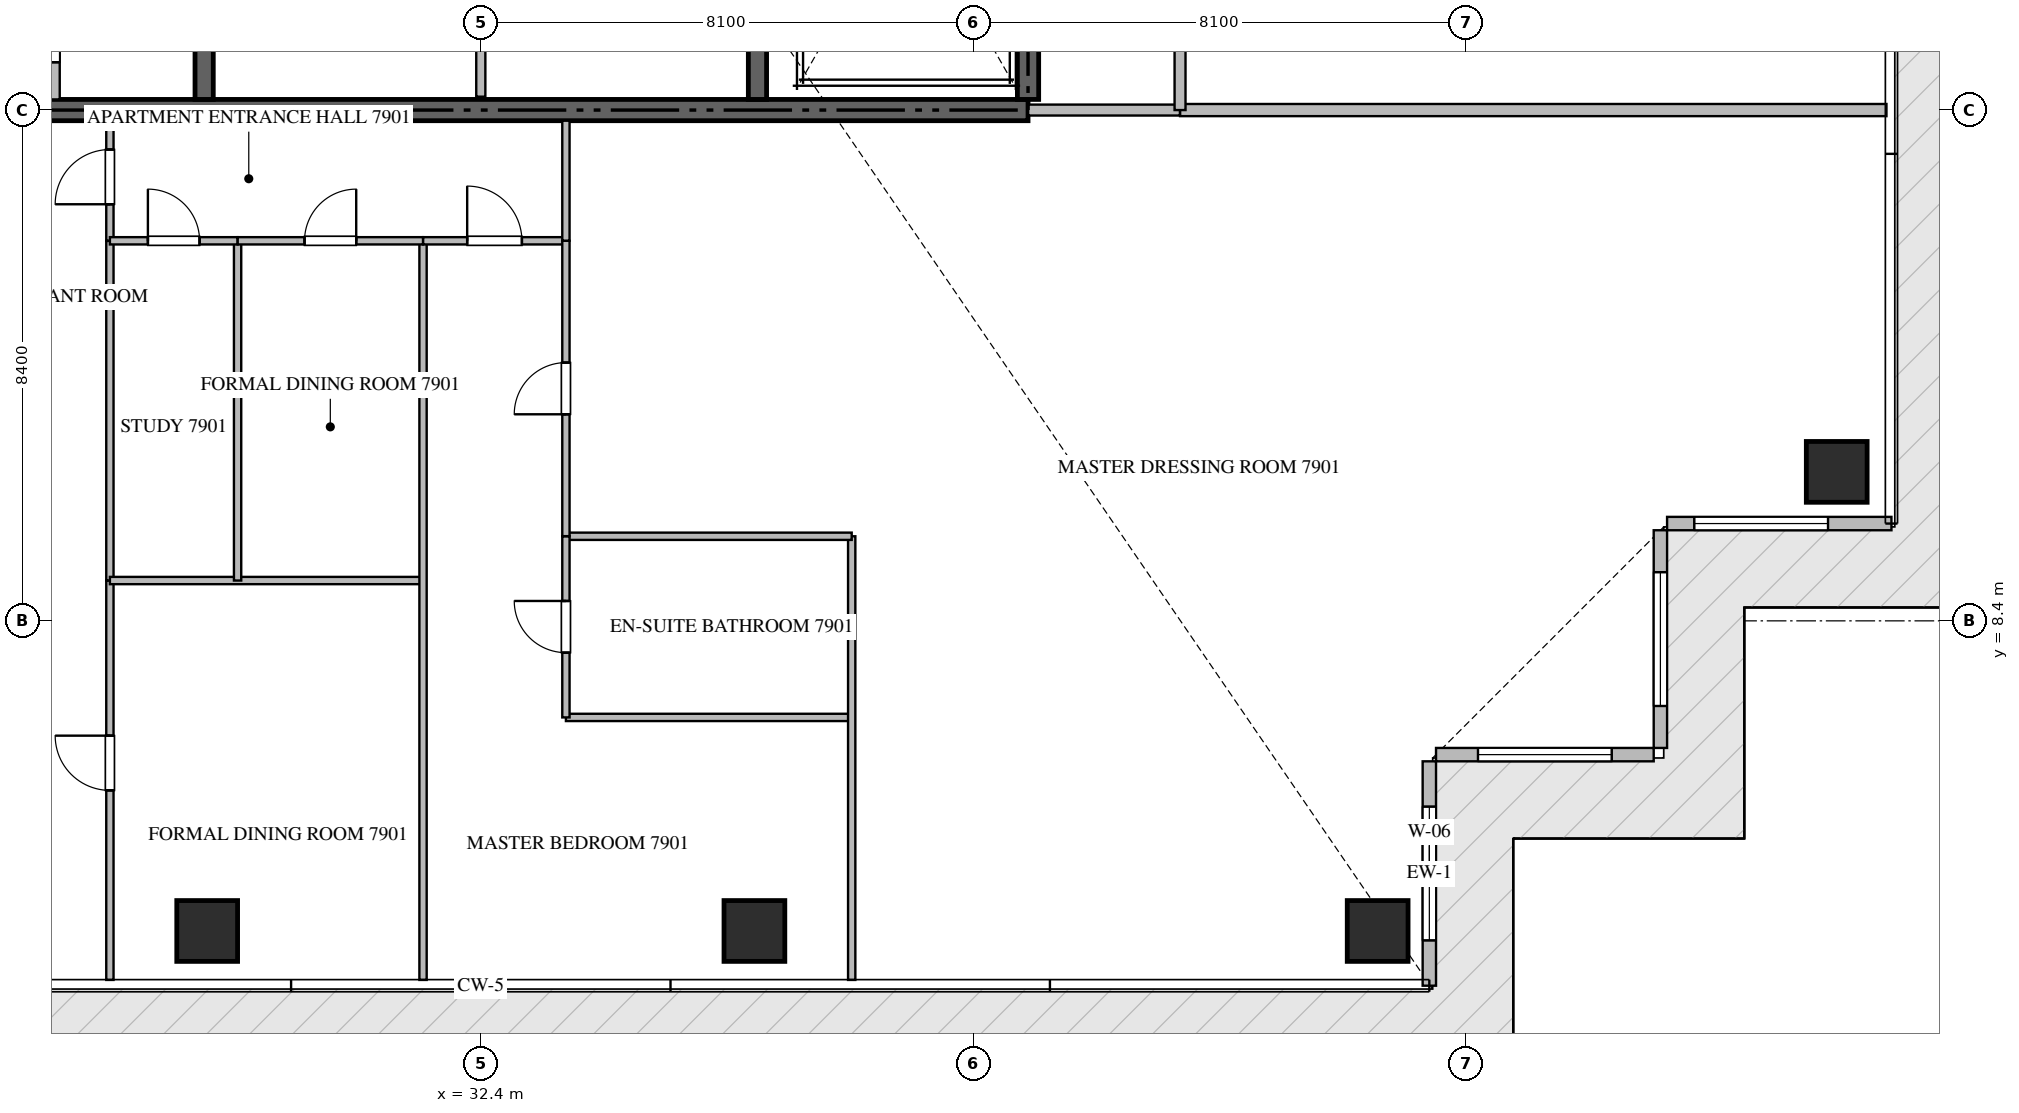
"""IFC4 building model, lengths in metres.
Left out: names, types, materials, properties, quantities, classifications, styles, units other than length and angle.
Written with IfcOpenShell. Run it as: python <this file> out.ifc"""

import sys

from ifc_helpers import new_model, si_unit, direction, frame, frame_2d, origin, origin_2d, place, context, subcontext, project, spatial, rectangle, extrude, source, transform, mapped, element, fill, save


model = new_model("IFC4")
c1 = context("Model", 3, precision=1e-05, world=origin(), true_north=direction((0.0, 1.0)))
c2 = subcontext(c1, "Body", "Model", "MODEL_VIEW")
j1 = project(units=[si_unit("LENGTHUNIT", "METRE"), si_unit("PLANEANGLEUNIT", "RADIAN")], contexts=[c1])
p1 = place(None, origin())
s1 = spatial("IfcSite", under=j1, at=p1, CompositionType="ELEMENT")
p2 = place(p1, origin())
s2 = spatial("IfcBuilding", under=s1, at=p2, CompositionType="ELEMENT")
p3 = place(p2, frame((0.0, 0.0, 317.75)))
s3 = spatial("IfcBuildingStorey", under=s2, at=p3, CompositionType="ELEMENT", Elevation=317.75)
p4 = place(p3, frame((23.4, 16.8, -0.26), z_axis=(0.0, 0.0, 1.0), x_axis=(1.0, 0.0, 0.0)))
e1 = element("IfcWall", 1, at=p4, inside=s3, PredefinedType="SHEAR", context=c2, shape_type="SweptSolid", body=[
    extrude(rectangle(XDim=18.0, YDim=0.35, at=frame_2d((9.0, 0.0))), origin(), (0.0, 0.0, 1.0), 4.048),
])
p5 = place(p3, frame((41.4, 16.975, -0.26), z_axis=(0.0, 0.0, 1.0), x_axis=(0.0, 1.0, 0.0)))
e2 = element("IfcWall", 2, at=p5, inside=s3, PredefinedType="SHEAR", context=c2, shape_type="SweptSolid", body=[
    extrude(rectangle(XDim=8.375, YDim=0.35, at=frame_2d((4.188, 0.0))), origin(), (0.0, 0.0, 1.0), 4.048),
])
p6 = place(p3, frame((27.85, 16.975, -0.26), z_axis=(0.0, 0.0, 1.0), x_axis=(0.0, 1.0, 0.0)))
e3 = element("IfcWall", 3, at=p6, inside=s3, PredefinedType="SHEAR", context=c2, shape_type="SweptSolid", body=[
    extrude(rectangle(XDim=4.875, YDim=0.3, at=frame_2d((2.438, 0.0))), origin(), (0.0, 0.0, 1.0), 4.048),
])
p7 = place(p3, frame((36.95, 16.975, -0.26), z_axis=(0.0, 0.0, 1.0), x_axis=(0.0, 1.0, 0.0)))
e4 = element("IfcWall", 4, at=p7, inside=s3, PredefinedType="SHEAR", context=c2, shape_type="SweptSolid", body=[
    extrude(rectangle(XDim=8.375, YDim=0.3, at=frame_2d((4.188, 0.0))), origin(), (0.0, 0.0, 1.0), 4.048),
])
m1 = source(origin(), c2, "Body", "SweptSolid", [
    extrude(rectangle(XDim=1.0, YDim=1.0, at=origin_2d()), origin(), (0.0, 0.0, 1.0), 4.05),
])
for number, where, z_axis, x_axis in (
    (5, (27.9, 3.3, -0.26), (0.0, 0.0, 1.0), (1.0, 0.0, 0.0)),
    (6, (36.9, 3.3, -0.26), (0.0, 0.0, 1.0), (1.0, 0.0, 0.0)),
    (7, (47.15, 3.3, -0.26), (0.0, 0.0, 1.0), (1.0, 0.0, 0.0)),
    (8, (54.7, 10.85, -0.26), (0.0, 0.0, 1.0), (1.0, 0.0, 0.0)),
):
    element("IfcColumn", number, at=place(p3, frame(where, z_axis=z_axis, x_axis=x_axis)), inside=s3, PredefinedType="COLUMN", context=c2, shape_type="MappedRepresentation", body=[
        mapped(m1, transform((0.0, 0.0, 0.0), scale=1.0)),
    ])
p8 = place(p3, frame((48.0, 2.4, 0.0), z_axis=(0.0, 0.0, 1.0), x_axis=(0.0, 1.0, 0.0)))
e9 = element("IfcWall", 9, at=p8, inside=s3, PredefinedType="ELEMENTEDWALL", context=c2, shape_type="SweptSolid", body=[
    extrude(rectangle(XDim=3.69, YDim=0.22, at=frame_2d((1.845, 0.0))), origin(), (0.0, 0.0, 1.0), 3.775),
])
p9 = place(p8, frame((0.745, 0.0, 0.65)))
e10 = element("IfcOpeningElement", 10, at=p9, cuts=e9, PredefinedType="OPENING", context=c2, shape_type="SweptSolid", body=[
    extrude(rectangle(XDim=2.2, YDim=2.4, at=frame_2d((1.1, 1.2))), frame((0.0, 0.12, 0.0), z_axis=(0.0, -1.0, 0.0), x_axis=(1.0, 0.0, 0.0)), (0.0, 0.0, 1.0), 0.24),
])
p10 = place(p3, frame((48.11, 6.2, 0.0), z_axis=(0.0, 0.0, 1.0), x_axis=(1.0, 0.0, 0.0)))
e11 = element("IfcWall", 11, at=p10, inside=s3, PredefinedType="ELEMENTEDWALL", context=c2, shape_type="SweptSolid", body=[
    extrude(rectangle(XDim=3.58, YDim=0.22, at=frame_2d((1.79, 0.0))), origin(), (0.0, 0.0, 1.0), 3.775),
])
p11 = place(p10, frame((0.69, 0.0, 0.65)))
e12 = element("IfcOpeningElement", 12, at=p11, cuts=e11, PredefinedType="OPENING", context=c2, shape_type="SweptSolid", body=[
    extrude(rectangle(XDim=2.2, YDim=2.4, at=frame_2d((1.1, 1.2))), frame((0.0, 0.12, 0.0), z_axis=(0.0, -1.0, 0.0), x_axis=(1.0, 0.0, 0.0)), (0.0, 0.0, 1.0), 0.24),
])
p12 = place(p3, frame((51.8, 6.31, 0.0), z_axis=(0.0, 0.0, 1.0), x_axis=(0.0, 1.0, 0.0)))
e13 = element("IfcWall", 13, at=p12, inside=s3, PredefinedType="ELEMENTEDWALL", context=c2, shape_type="SweptSolid", body=[
    extrude(rectangle(XDim=3.58, YDim=0.22, at=frame_2d((1.79, 0.0))), origin(), (0.0, 0.0, 1.0), 3.775),
])
p13 = place(p12, frame((0.69, 0.0, 0.65)))
e14 = element("IfcOpeningElement", 14, at=p13, cuts=e13, PredefinedType="OPENING", context=c2, shape_type="SweptSolid", body=[
    extrude(rectangle(XDim=2.2, YDim=2.4, at=frame_2d((1.1, 1.2))), frame((0.0, 0.12, 0.0), z_axis=(0.0, -1.0, 0.0), x_axis=(1.0, 0.0, 0.0)), (0.0, 0.0, 1.0), 0.24),
])
p14 = place(p3, frame((51.91, 10.0, 0.0), z_axis=(0.0, 0.0, 1.0), x_axis=(1.0, 0.0, 0.0)))
e15 = element("IfcWall", 15, at=p14, inside=s3, PredefinedType="ELEMENTEDWALL", context=c2, shape_type="SweptSolid", body=[
    extrude(rectangle(XDim=3.69, YDim=0.22, at=frame_2d((1.845, 0.0))), origin(), (0.0, 0.0, 1.0), 3.775),
])
p15 = place(p14, frame((0.447, 0.0, 0.65)))
e16 = element("IfcOpeningElement", 16, at=p15, cuts=e15, PredefinedType="OPENING", context=c2, shape_type="SweptSolid", body=[
    extrude(rectangle(XDim=2.2, YDim=2.4, at=frame_2d((1.1, 1.2))), frame((0.0, 0.12, 0.0), z_axis=(0.0, -1.0, 0.0), x_axis=(1.0, 0.0, 0.0)), (0.0, 0.0, 1.0), 0.24),
])
p16 = place(p3, frame((25.4, 16.975, 0.0), z_axis=(0.0, 0.0, 1.0), x_axis=(0.0, 1.0, 0.0)))
e17 = element("IfcWall", 17, at=p16, inside=s3, PredefinedType="PARTITIONING", context=c2, shape_type="SweptSolid", body=[
    extrude(rectangle(XDim=2.075, YDim=0.15, at=frame_2d((1.038, 0.0))), origin(), (0.0, 0.0, 1.0), 3.79),
])
p17 = place(p16, frame((0.612, 0.0, 0.0)))
e18 = element("IfcOpeningElement", 18, at=p17, cuts=e17, PredefinedType="OPENING", context=c2, shape_type="SweptSolid", body=[
    extrude(rectangle(XDim=0.85, YDim=2.1, at=frame_2d((0.425, 1.05))), frame((0.0, 0.085, 0.0), z_axis=(0.0, -1.0, 0.0), x_axis=(1.0, 0.0, 0.0)), (0.0, 0.0, 1.0), 0.17),
])
p18 = place(p3, frame((32.4, 17.02, 0.0), z_axis=(0.0, 0.0, 1.0), x_axis=(0.0, 1.0, 0.0)))
e19 = element("IfcWall", 19, at=p18, inside=s3, PredefinedType="PARTITIONING", context=c2, shape_type="SweptSolid", body=[
    extrude(rectangle(XDim=2.73, YDim=0.15, at=frame_2d((1.365, 0.0))), origin(), (0.0, 0.0, 1.0), 3.79),
])
p19 = place(p3, frame((43.9, 16.8, 0.0), z_axis=(0.0, 0.0, 1.0), x_axis=(1.0, 0.0, 0.0)))
e20 = element("IfcWall", 20, at=p19, inside=s3, PredefinedType="PARTITIONING", context=c2, shape_type="SweptSolid", body=[
    extrude(rectangle(XDim=11.618, YDim=0.2, at=frame_2d((5.809, 0.0))), origin(), (0.0, 0.0, 1.0), 3.79),
])
p20 = place(p3, frame((41.402, 16.8, 0.0), z_axis=(0.0, 0.0, 1.0), x_axis=(1.0, 0.0, 0.0)))
e21 = element("IfcWall", 21, at=p20, inside=s3, PredefinedType="PARTITIONING", context=c2, shape_type="SweptSolid", body=[
    extrude(rectangle(XDim=2.496, YDim=0.18, at=frame_2d((1.248, 0.0))), origin(), (0.0, 0.0, 1.0), 3.79),
])
p21 = place(p3, frame((43.9, 16.8, 0.0), z_axis=(0.0, 0.0, 1.0), x_axis=(0.0, 1.0, 0.0)))
e22 = element("IfcWall", 22, at=p21, inside=s3, PredefinedType="PARTITIONING", context=c2, shape_type="SweptSolid", body=[
    extrude(rectangle(XDim=16.8, YDim=0.18, at=frame_2d((8.4, 0.0))), origin(), (0.0, 0.0, 1.0), 3.79),
])
p22 = place(p21, frame((1.3, 0.0, 0.0)))
e23 = element("IfcOpeningElement", 23, at=p22, cuts=e22, PredefinedType="OPENING", context=c2, shape_type="SweptSolid", body=[
    extrude(rectangle(XDim=1.0, YDim=2.15, at=frame_2d((0.5, 1.075))), frame((0.0, 0.1, 0.0), z_axis=(0.0, -1.0, 0.0), x_axis=(1.0, 0.0, 0.0)), (0.0, 0.0, 1.0), 0.2),
])
p23 = place(p3, frame((26.3, 14.65, 0.0), z_axis=(0.0, 0.0, 1.0), x_axis=(0.0, 1.0, 0.0)))
e24 = element("IfcWall", 24, at=p23, inside=s3, PredefinedType="PARTITIONING", context=c2, shape_type="SweptSolid", body=[
    extrude(rectangle(XDim=1.975, YDim=0.12, at=frame_2d((0.988, 0.0))), origin(), (0.0, 0.0, 1.0), 3.79),
])
p24 = place(p23, frame((0.601, 0.0, 0.0)))
e25 = element("IfcOpeningElement", 25, at=p24, cuts=e24, PredefinedType="OPENING", context=c2, shape_type="SweptSolid", body=[
    extrude(rectangle(XDim=0.9, YDim=2.1, at=frame_2d((0.45, 1.05))), frame((0.0, 0.07, 0.0), z_axis=(0.0, -1.0, 0.0), x_axis=(1.0, 0.0, 0.0)), (0.0, 0.0, 1.0), 0.14),
])
p25 = place(p3, frame((26.3, 2.495, 0.0), z_axis=(0.0, 0.0, 1.0), x_axis=(0.0, 1.0, 0.0)))
e26 = element("IfcWall", 26, at=p25, inside=s3, PredefinedType="PARTITIONING", context=c2, shape_type="SweptSolid", body=[
    extrude(rectangle(XDim=6.568, YDim=0.12, at=frame_2d((3.284, 0.0))), origin(), (0.0, 0.0, 1.0), 3.79),
])
p26 = place(p25, frame((3.117, 0.0, 0.0)))
e27 = element("IfcOpeningElement", 27, at=p26, cuts=e26, PredefinedType="OPENING", context=c2, shape_type="SweptSolid", body=[
    extrude(rectangle(XDim=0.9, YDim=2.1, at=frame_2d((0.45, 1.05))), frame((0.0, 0.07, 0.0), z_axis=(0.0, -1.0, 0.0), x_axis=(1.0, 0.0, 0.0)), (0.0, 0.0, 1.0), 0.14),
])
p27 = place(p3, frame((26.3, 9.065, 0.0), z_axis=(0.0, 0.0, 1.0), x_axis=(0.0, 1.0, 0.0)))
e28 = element("IfcWall", 28, at=p27, inside=s3, PredefinedType="PARTITIONING", context=c2, shape_type="SweptSolid", body=[
    extrude(rectangle(XDim=5.583, YDim=0.12, at=frame_2d((2.792, 0.0))), origin(), (0.0, 0.0, 1.0), 3.79),
])
p28 = place(p3, frame((26.3, 9.063, 0.0), z_axis=(0.0, 0.0, 1.0), x_axis=(1.0, 0.0, 0.0)))
e29 = element("IfcWall", 29, at=p28, inside=s3, PredefinedType="PARTITIONING", context=c2, shape_type="SweptSolid", body=[
    extrude(rectangle(XDim=5.15, YDim=0.12, at=frame_2d((2.575, 0.0))), origin(), (0.0, 0.0, 1.0), 3.79),
])
p29 = place(p3, frame((31.45, 2.495, 0.0), z_axis=(0.0, 0.0, 1.0), x_axis=(0.0, 1.0, 0.0)))
e30 = element("IfcWall", 30, at=p29, inside=s3, PredefinedType="PARTITIONING", context=c2, shape_type="SweptSolid", body=[
    extrude(rectangle(XDim=12.155, YDim=0.12, at=frame_2d((6.077, 0.0))), origin(), (0.0, 0.0, 1.0), 3.79),
])
p30 = place(p3, frame((28.4, 9.063, 0.0), z_axis=(0.0, 0.0, 1.0), x_axis=(0.0, 1.0, 0.0)))
e31 = element("IfcWall", 31, at=p30, inside=s3, PredefinedType="PARTITIONING", context=c2, shape_type="SweptSolid", body=[
    extrude(rectangle(XDim=5.587, YDim=0.12, at=frame_2d((2.793, 0.0))), origin(), (0.0, 0.0, 1.0), 3.79),
])
p31 = place(p3, frame((26.3, 14.65, 0.0), z_axis=(0.0, 0.0, 1.0), x_axis=(1.0, 0.0, 0.0)))
e32 = element("IfcWall", 32, at=p31, inside=s3, PredefinedType="PARTITIONING", context=c2, shape_type="SweptSolid", body=[
    extrude(rectangle(XDim=2.1, YDim=0.12, at=frame_2d((1.05, 0.0))), origin(), (0.0, 0.0, 1.0), 3.79),
])
p32 = place(p31, frame((0.625, 0.0, 0.0)))
e33 = element("IfcOpeningElement", 33, at=p32, cuts=e32, PredefinedType="OPENING", context=c2, shape_type="SweptSolid", body=[
    extrude(rectangle(XDim=0.85, YDim=2.1, at=frame_2d((0.425, 1.05))), frame((0.0, 0.07, 0.0), z_axis=(0.0, -1.0, 0.0), x_axis=(1.0, 0.0, 0.0)), (0.0, 0.0, 1.0), 0.14),
])
p33 = place(p3, frame((28.402, 14.65, 0.0), z_axis=(0.0, 0.0, 1.0), x_axis=(1.0, 0.0, 0.0)))
e34 = element("IfcWall", 34, at=p33, inside=s3, PredefinedType="PARTITIONING", context=c2, shape_type="SweptSolid", body=[
    extrude(rectangle(XDim=3.048, YDim=0.12, at=frame_2d((1.524, 0.0))), origin(), (0.0, 0.0, 1.0), 3.79),
])
p34 = place(p33, frame((1.099, 0.0, 0.0)))
e35 = element("IfcOpeningElement", 35, at=p34, cuts=e34, PredefinedType="OPENING", context=c2, shape_type="SweptSolid", body=[
    extrude(rectangle(XDim=0.85, YDim=2.1, at=frame_2d((0.425, 1.05))), frame((0.0, 0.07, 0.0), z_axis=(0.0, -1.0, 0.0), x_axis=(1.0, 0.0, 0.0)), (0.0, 0.0, 1.0), 0.14),
])
p35 = place(p3, frame((31.452, 14.65, 0.0), z_axis=(0.0, 0.0, 1.0), x_axis=(1.0, 0.0, 0.0)))
e36 = element("IfcWall", 36, at=p35, inside=s3, PredefinedType="PARTITIONING", context=c2, shape_type="SweptSolid", body=[
    extrude(rectangle(XDim=2.348, YDim=0.12, at=frame_2d((1.174, 0.0))), origin(), (0.0, 0.0, 1.0), 3.79),
])
p36 = place(p35, frame((0.724, 0.0, 0.0)))
e37 = element("IfcOpeningElement", 37, at=p36, cuts=e36, PredefinedType="OPENING", context=c2, shape_type="SweptSolid", body=[
    extrude(rectangle(XDim=0.9, YDim=2.1, at=frame_2d((0.45, 1.05))), frame((0.0, 0.07, 0.0), z_axis=(0.0, -1.0, 0.0), x_axis=(1.0, 0.0, 0.0)), (0.0, 0.0, 1.0), 0.14),
])
p37 = place(p3, frame((33.8, 6.812, 0.0), z_axis=(0.0, 0.0, 1.0), x_axis=(1.0, 0.0, 0.0)))
e38 = element("IfcWall", 38, at=p37, inside=s3, PredefinedType="PARTITIONING", context=c2, shape_type="SweptSolid", body=[
    extrude(rectangle(XDim=4.7, YDim=0.12, at=frame_2d((2.35, 0.0))), origin(), (0.0, 0.0, 1.0), 3.79),
])
p38 = place(p3, frame((38.5, 2.495, 0.0), z_axis=(0.0, 0.0, 1.0), x_axis=(0.0, 1.0, 0.0)))
e39 = element("IfcWall", 39, at=p38, inside=s3, PredefinedType="PARTITIONING", context=c2, shape_type="SweptSolid", body=[
    extrude(rectangle(XDim=7.296, YDim=0.12, at=frame_2d((3.648, 0.0))), origin(), (0.0, 0.0, 1.0), 3.79),
])
p39 = place(p3, frame((33.8, 9.791, 0.0), z_axis=(0.0, 0.0, 1.0), x_axis=(1.0, 0.0, 0.0)))
e40 = element("IfcWall", 40, at=p39, inside=s3, PredefinedType="PARTITIONING", context=c2, shape_type="SweptSolid", body=[
    extrude(rectangle(XDim=4.7, YDim=0.12, at=frame_2d((2.35, 0.0))), origin(), (0.0, 0.0, 1.0), 3.79),
])
p40 = place(p3, frame((33.8, 6.812, 0.0), z_axis=(0.0, 0.0, 1.0), x_axis=(0.0, 1.0, 0.0)))
e41 = element("IfcWall", 41, at=p40, inside=s3, PredefinedType="PARTITIONING", context=c2, shape_type="SweptSolid", body=[
    extrude(rectangle(XDim=2.979, YDim=0.12, at=frame_2d((1.49, 0.0))), origin(), (0.0, 0.0, 1.0), 3.79),
])
p41 = place(p40, frame((1.065, 0.0, 0.0)))
e42 = element("IfcOpeningElement", 42, at=p41, cuts=e41, PredefinedType="OPENING", context=c2, shape_type="SweptSolid", body=[
    extrude(rectangle(XDim=0.85, YDim=2.1, at=frame_2d((0.425, 1.05))), frame((0.0, 0.07, 0.0), z_axis=(0.0, -1.0, 0.0), x_axis=(1.0, 0.0, 0.0)), (0.0, 0.0, 1.0), 0.14),
])
p42 = place(p3, frame((33.8, 9.793, 0.0), z_axis=(0.0, 0.0, 1.0), x_axis=(0.0, 1.0, 0.0)))
e43 = element("IfcWall", 43, at=p42, inside=s3, PredefinedType="PARTITIONING", context=c2, shape_type="SweptSolid", body=[
    extrude(rectangle(XDim=4.857, YDim=0.12, at=frame_2d((2.428, 0.0))), origin(), (0.0, 0.0, 1.0), 3.79),
])
p43 = place(p42, frame((2.004, 0.0, 0.0)))
e44 = element("IfcOpeningElement", 44, at=p43, cuts=e43, PredefinedType="OPENING", context=c2, shape_type="SweptSolid", body=[
    extrude(rectangle(XDim=0.85, YDim=2.1, at=frame_2d((0.425, 1.05))), frame((0.0, 0.07, 0.0), z_axis=(0.0, -1.0, 0.0), x_axis=(1.0, 0.0, 0.0)), (0.0, 0.0, 1.0), 0.14),
])
p44 = place(p3, frame((33.8, 14.652, 0.0), z_axis=(0.0, 0.0, 1.0), x_axis=(0.0, 1.0, 0.0)))
e45 = element("IfcWall", 45, at=p44, inside=s3, PredefinedType="PARTITIONING", context=c2, shape_type="SweptSolid", body=[
    extrude(rectangle(XDim=1.973, YDim=0.12, at=frame_2d((0.986, 0.0))), origin(), (0.0, 0.0, 1.0), 3.79),
])
m2 = source(origin(), c2, "Body", "SweptSolid", [
    extrude(rectangle(XDim=2.2, YDim=2.4, at=frame_2d((1.1, 1.2))), frame((0.0, 0.03, 0.0), z_axis=(0.0, -1.0, 0.0), x_axis=(1.0, 0.0, 0.0)), (0.0, 0.0, 1.0), 0.06),
])
p45 = place(p9, origin())
e46 = element("IfcWindow", 46, at=p45, inside=s3, PartitioningType="SINGLE_PANEL", PredefinedType="WINDOW", context=c2, shape_type="MappedRepresentation", body=[
    mapped(m2, transform((0.0, 0.0, 0.0), scale=1.0)),
])
fill(e10, e46)
p46 = place(p11, origin())
e47 = element("IfcWindow", 47, at=p46, inside=s3, PartitioningType="SINGLE_PANEL", PredefinedType="WINDOW", context=c2, shape_type="MappedRepresentation", body=[
    mapped(m2, transform((0.0, 0.0, 0.0), scale=1.0)),
])
fill(e12, e47)
p47 = place(p13, origin())
e48 = element("IfcWindow", 48, at=p47, inside=s3, PartitioningType="SINGLE_PANEL", PredefinedType="WINDOW", context=c2, shape_type="MappedRepresentation", body=[
    mapped(m2, transform((0.0, 0.0, 0.0), scale=1.0)),
])
fill(e14, e48)
p48 = place(p15, origin())
e49 = element("IfcWindow", 49, at=p48, inside=s3, PartitioningType="SINGLE_PANEL", PredefinedType="WINDOW", context=c2, shape_type="MappedRepresentation", body=[
    mapped(m2, transform((0.0, 0.0, 0.0), scale=1.0)),
])
fill(e16, e49)
m3 = source(origin(), c2, "Body", "SweptSolid", [
    extrude(rectangle(XDim=0.85, YDim=2.1, at=frame_2d((0.425, 1.05))), frame((0.0, 0.025, 0.0), z_axis=(0.0, -1.0, 0.0), x_axis=(1.0, 0.0, 0.0)), (0.0, 0.0, 1.0), 0.05),
])
p49 = place(p17, origin())
e50 = element("IfcDoor", 50, at=p49, inside=s3, OperationType="SINGLE_SWING_RIGHT", PredefinedType="DOOR", context=c2, shape_type="MappedRepresentation", body=[
    mapped(m3, transform((0.0, 0.0, 0.0), scale=1.0)),
])
fill(e18, e50)
m4 = source(origin(), c2, "Body", "SweptSolid", [
    extrude(rectangle(XDim=0.9, YDim=2.1, at=frame_2d((0.45, 1.05))), frame((0.0, 0.025, 0.0), z_axis=(0.0, -1.0, 0.0), x_axis=(1.0, 0.0, 0.0)), (0.0, 0.0, 1.0), 0.05),
])
p50 = place(p24, origin())
e51 = element("IfcDoor", 51, at=p50, inside=s3, OperationType="SINGLE_SWING_LEFT", PredefinedType="DOOR", context=c2, shape_type="MappedRepresentation", body=[
    mapped(m4, transform((0.0, 0.0, 0.0), scale=1.0)),
])
fill(e25, e51)
p51 = place(p26, origin())
e52 = element("IfcDoor", 52, at=p51, inside=s3, OperationType="SINGLE_SWING_RIGHT", PredefinedType="DOOR", context=c2, shape_type="MappedRepresentation", body=[
    mapped(m4, transform((0.0, 0.0, 0.0), scale=1.0)),
])
fill(e27, e52)
p52 = place(p32, origin())
e53 = element("IfcDoor", 53, at=p52, inside=s3, OperationType="SINGLE_SWING_LEFT", PredefinedType="DOOR", context=c2, shape_type="MappedRepresentation", body=[
    mapped(m3, transform((0.0, 0.0, 0.0), scale=1.0)),
])
fill(e33, e53)
p53 = place(p34, origin())
e54 = element("IfcDoor", 54, at=p53, inside=s3, OperationType="SINGLE_SWING_RIGHT", PredefinedType="DOOR", context=c2, shape_type="MappedRepresentation", body=[
    mapped(m3, transform((0.0, 0.0, 0.0), scale=1.0)),
])
fill(e35, e54)
p54 = place(p36, origin())
e55 = element("IfcDoor", 55, at=p54, inside=s3, OperationType="SINGLE_SWING_LEFT", PredefinedType="DOOR", context=c2, shape_type="MappedRepresentation", body=[
    mapped(m4, transform((0.0, 0.0, 0.0), scale=1.0)),
])
fill(e37, e55)
p55 = place(p41, origin())
e56 = element("IfcDoor", 56, at=p55, inside=s3, OperationType="SINGLE_SWING_RIGHT", PredefinedType="DOOR", context=c2, shape_type="MappedRepresentation", body=[
    mapped(m3, transform((0.0, 0.0, 0.0), scale=1.0)),
])
fill(e42, e56)
p56 = place(p43, origin())
e57 = element("IfcDoor", 57, at=p56, inside=s3, OperationType="SINGLE_SWING_LEFT", PredefinedType="DOOR", context=c2, shape_type="MappedRepresentation", body=[
    mapped(m3, transform((0.0, 0.0, 0.0), scale=1.0)),
])
fill(e44, e57)
save(model, sys.argv[1])
